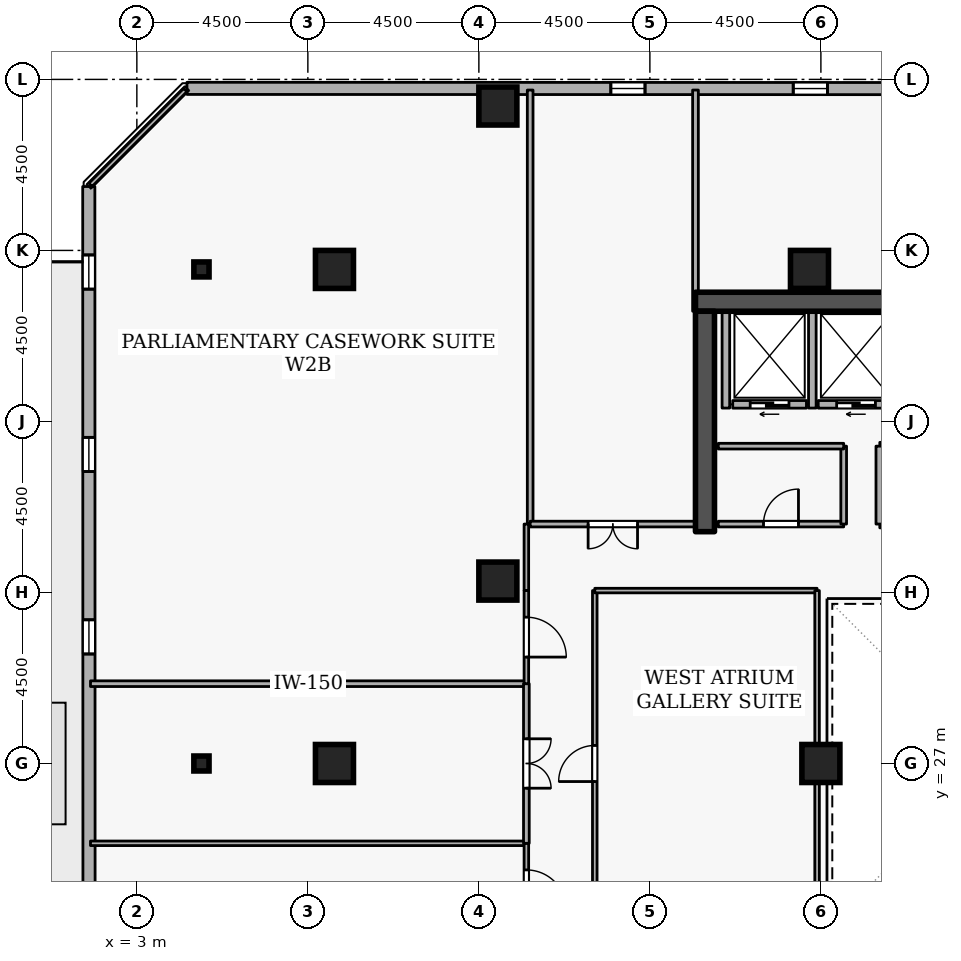
"""IFC4 building model, lengths in metres.
Left out: names, types, materials, properties, quantities, classifications, styles, units other than length and angle.
Written with IfcOpenShell. Run it as: python <this file> out.ifc"""

import sys

from ifc_helpers import new_model, si_unit, direction, frame, frame_2d, origin, origin_2d, place, context, subcontext, project, spatial, rectangle, i_section, extrude, element, fill, save


model = new_model("IFC4")
c1 = context("Model", 3, precision=1e-05, world=origin(), true_north=direction((0.0, 1.0)))
c2 = subcontext(c1, "Body", "Model", "MODEL_VIEW")
j1 = project(units=[si_unit("LENGTHUNIT", "METRE"), si_unit("PLANEANGLEUNIT", "RADIAN")], contexts=[c1])
p1 = place(None, origin())
s1 = spatial("IfcSite", under=j1, at=p1, CompositionType="ELEMENT")
p2 = place(p1, origin())
s2 = spatial("IfcBuilding", under=s1, at=p2, CompositionType="ELEMENT")
p3 = place(p2, frame((0.0, 0.0, 233.1)))
s3 = spatial("IfcBuildingStorey", under=s2, at=p3, CompositionType="ELEMENT", Elevation=233.1)
p4 = place(p3, frame((17.7, 39.15, 0.0), z_axis=(0.0, 0.0, 1.0), x_axis=(1.0, 0.0, 0.0)))
e1 = element("IfcWall", 1, at=p4, inside=s3, PredefinedType="SHEAR", context=c2, shape_type="SweptSolid", body=[
    extrude(rectangle(XDim=15.6, YDim=0.5, at=frame_2d((7.8, 0.0))), origin(), (0.0, 0.0, 1.0), 3.6),
])
p5 = place(p3, frame((17.95, 33.1, 0.0), z_axis=(0.0, 0.0, 1.0), x_axis=(0.0, 1.0, 0.0)))
e2 = element("IfcWall", 2, at=p5, inside=s3, PredefinedType="SHEAR", context=c2, shape_type="SweptSolid", body=[
    extrude(rectangle(XDim=5.8, YDim=0.5, at=frame_2d((2.9, 0.0))), origin(), (0.0, 0.0, 1.0), 3.6),
])
for number, where, z_axis, x_axis in (
    (3, (12.5, 44.3, 0.0), (0.0, 0.0, 1.0), (1.0, 0.0, 0.0)),
    (4, (8.2, 27.0, 0.0), (0.0, 0.0, 1.0), (1.0, 0.0, 0.0)),
    (5, (8.2, 40.0, 0.0), (0.0, 0.0, 1.0), (1.0, 0.0, 0.0)),
    (6, (12.5, 31.8, 0.0), (0.0, 0.0, 1.0), (1.0, 0.0, 0.0)),
    (7, (20.7, 40.0, 0.0), (0.0, 0.0, 1.0), (1.0, 0.0, 0.0)),
    (8, (21.0, 27.0, 0.0), (0.0, 0.0, 1.0), (1.0, 0.0, 0.0)),
):
    element("IfcColumn", number, at=place(p3, frame(where, z_axis=z_axis, x_axis=x_axis)), inside=s3, PredefinedType="COLUMN", context=c2, shape_type="SweptSolid", body=[
        extrude(rectangle(XDim=1.0, YDim=1.0, at=origin_2d()), origin(), (0.0, 0.0, 1.0), 3.6),
    ])
for number, where, z_axis, x_axis in (
    (9, (4.7, 27.0, 0.0), (0.0, 0.0, 1.0), (1.0, 0.0, 0.0)),
    (10, (4.7, 40.0, 0.0), (0.0, 0.0, 1.0), (1.0, 0.0, 0.0)),
):
    element("IfcColumn", number, at=place(p3, frame(where, z_axis=z_axis, x_axis=x_axis)), inside=s3, PredefinedType="COLUMN", context=c2, shape_type="SweptSolid", body=[
        extrude(i_section(OverallWidth=0.399, OverallDepth=0.394, WebThickness=0.023, FlangeThickness=0.037, FilletRadius=0.015, at=origin_2d()), origin(), (0.0, 0.0, 1.0), 3.6),
    ])
p6 = place(p3, frame((37.372, 44.754, 0.0), z_axis=(0.0, 0.0, 1.0), x_axis=(-0.999999944762, 0.000332378036, 0.0)))
e11 = element("IfcWall", 11, at=p6, inside=s3, PredefinedType="STANDARD", context=c2, shape_type="SweptSolid", body=[
    extrude(rectangle(XDim=33.054, YDim=0.32, at=frame_2d((16.527, 0.0))), origin(), (0.0, 0.0, 1.0), 2.7),
])
p7 = place(p6, frame((1.8, 0.0, 0.72)))
e12 = element("IfcOpeningElement", 12, at=p7, cuts=e11, PredefinedType="OPENING", context=c2, shape_type="SweptSolid", body=[
    extrude(rectangle(XDim=0.9, YDim=1.75, at=frame_2d((0.45, 0.875))), frame((0.0, 0.17, 0.0), z_axis=(0.0, -1.0, 0.0), x_axis=(1.0, 0.0, 0.0)), (0.0, 0.0, 1.0), 0.34),
])
p8 = place(p6, frame((6.6, 0.0, 0.72)))
e13 = element("IfcOpeningElement", 13, at=p8, cuts=e11, PredefinedType="OPENING", context=c2, shape_type="SweptSolid", body=[
    extrude(rectangle(XDim=0.9, YDim=1.75, at=frame_2d((0.45, 0.875))), frame((0.0, 0.17, 0.0), z_axis=(0.0, -1.0, 0.0), x_axis=(1.0, 0.0, 0.0)), (0.0, 0.0, 1.0), 0.34),
])
p9 = place(p6, frame((16.2, 0.0, 0.72)))
e14 = element("IfcOpeningElement", 14, at=p9, cuts=e11, PredefinedType="OPENING", context=c2, shape_type="SweptSolid", body=[
    extrude(rectangle(XDim=0.9, YDim=1.75, at=frame_2d((0.45, 0.875))), frame((0.0, 0.17, 0.0), z_axis=(0.0, -1.0, 0.0), x_axis=(1.0, 0.0, 0.0)), (0.0, 0.0, 1.0), 0.34),
])
p10 = place(p6, frame((21.0, 0.0, 0.72)))
e15 = element("IfcOpeningElement", 15, at=p10, cuts=e11, PredefinedType="OPENING", context=c2, shape_type="SweptSolid", body=[
    extrude(rectangle(XDim=0.9, YDim=1.75, at=frame_2d((0.45, 0.875))), frame((0.0, 0.17, 0.0), z_axis=(0.0, -1.0, 0.0), x_axis=(1.0, 0.0, 0.0)), (0.0, 0.0, 1.0), 0.34),
])
p11 = place(p3, frame((1.735, 42.181, 0.0), z_axis=(0.0, 0.0, 1.0), x_axis=(0.000332378036, -0.999999944762, 0.0)))
e16 = element("IfcWall", 16, at=p11, inside=s3, PredefinedType="STANDARD", context=c2, shape_type="SweptSolid", body=[
    extrude(rectangle(XDim=33.054, YDim=0.32, at=frame_2d((16.527, 0.0))), origin(), (0.0, 0.0, 1.0), 2.7),
])
p12 = place(p11, frame((18.327, 0.0, 0.0)))
e17 = element("IfcOpeningElement", 17, at=p12, cuts=e16, PredefinedType="OPENING", context=c2, shape_type="SweptSolid", body=[
    extrude(rectangle(XDim=1.0, YDim=2.08, at=frame_2d((0.5, 1.04))), frame((0.0, 0.17, 0.0), z_axis=(0.0, -1.0, 0.0), x_axis=(1.0, 0.0, 0.0)), (0.0, 0.0, 1.0), 0.34),
])
p13 = place(p11, frame((1.8, 0.0, 0.72)))
e18 = element("IfcOpeningElement", 18, at=p13, cuts=e16, PredefinedType="OPENING", context=c2, shape_type="SweptSolid", body=[
    extrude(rectangle(XDim=0.9, YDim=1.75, at=frame_2d((0.45, 0.875))), frame((0.0, 0.17, 0.0), z_axis=(0.0, -1.0, 0.0), x_axis=(1.0, 0.0, 0.0)), (0.0, 0.0, 1.0), 0.34),
])
p14 = place(p11, frame((6.6, 0.0, 0.72)))
e19 = element("IfcOpeningElement", 19, at=p14, cuts=e16, PredefinedType="OPENING", context=c2, shape_type="SweptSolid", body=[
    extrude(rectangle(XDim=0.9, YDim=1.75, at=frame_2d((0.45, 0.875))), frame((0.0, 0.17, 0.0), z_axis=(0.0, -1.0, 0.0), x_axis=(1.0, 0.0, 0.0)), (0.0, 0.0, 1.0), 0.34),
])
p15 = place(p11, frame((11.4, 0.0, 0.72)))
e20 = element("IfcOpeningElement", 20, at=p15, cuts=e16, PredefinedType="OPENING", context=c2, shape_type="SweptSolid", body=[
    extrude(rectangle(XDim=0.9, YDim=1.75, at=frame_2d((0.45, 0.875))), frame((0.0, 0.17, 0.0), z_axis=(0.0, -1.0, 0.0), x_axis=(1.0, 0.0, 0.0)), (0.0, 0.0, 1.0), 0.34),
])
p16 = place(p11, frame((21.0, 0.0, 0.72)))
e21 = element("IfcOpeningElement", 21, at=p16, cuts=e16, PredefinedType="OPENING", context=c2, shape_type="SweptSolid", body=[
    extrude(rectangle(XDim=0.9, YDim=1.75, at=frame_2d((0.45, 0.875))), frame((0.0, 0.17, 0.0), z_axis=(0.0, -1.0, 0.0), x_axis=(1.0, 0.0, 0.0)), (0.0, 0.0, 1.0), 0.34),
])
p17 = place(p11, frame((25.8, 0.0, 0.72)))
e22 = element("IfcOpeningElement", 22, at=p17, cuts=e16, PredefinedType="OPENING", context=c2, shape_type="SweptSolid", body=[
    extrude(rectangle(XDim=0.9, YDim=1.75, at=frame_2d((0.45, 0.875))), frame((0.0, 0.17, 0.0), z_axis=(0.0, -1.0, 0.0), x_axis=(1.0, 0.0, 0.0)), (0.0, 0.0, 1.0), 0.34),
])
p18 = place(p3, frame((22.92, 36.45, 0.0), z_axis=(0.0, 0.0, 1.0), x_axis=(-1.0, 0.0, 0.0)))
e23 = element("IfcWall", 23, at=p18, inside=s3, PredefinedType="STANDARD", context=c2, shape_type="SweptSolid", body=[
    extrude(rectangle(XDim=1.99, YDim=0.2, at=frame_2d((0.995, 0.0))), origin(), (0.0, 0.0, 1.0), 3.34),
])
p19 = place(p18, frame((0.485, 0.0, 0.0)))
e24 = element("IfcOpeningElement", 24, at=p19, cuts=e23, PredefinedType="OPENING", context=c2, shape_type="SweptSolid", body=[
    extrude(rectangle(XDim=1.02, YDim=2.06, at=frame_2d((0.51, 1.03))), frame((0.0, 0.11, 0.0), z_axis=(0.0, -1.0, 0.0), x_axis=(1.0, 0.0, 0.0)), (0.0, 0.0, 1.0), 0.22),
])
p20 = place(p3, frame((20.62, 36.45, 0.0), z_axis=(0.0, 0.0, 1.0), x_axis=(-1.0, 0.0, 0.0)))
e25 = element("IfcWall", 25, at=p20, inside=s3, PredefinedType="STANDARD", context=c2, shape_type="SweptSolid", body=[
    extrude(rectangle(XDim=1.94, YDim=0.2, at=frame_2d((0.97, 0.0))), origin(), (0.0, 0.0, 1.0), 3.34),
])
p21 = place(p20, frame((0.46, 0.0, 0.0)))
e26 = element("IfcOpeningElement", 26, at=p21, cuts=e25, PredefinedType="OPENING", context=c2, shape_type="SweptSolid", body=[
    extrude(rectangle(XDim=1.02, YDim=2.06, at=frame_2d((0.51, 1.03))), frame((0.0, 0.11, 0.0), z_axis=(0.0, -1.0, 0.0), x_axis=(1.0, 0.0, 0.0)), (0.0, 0.0, 1.0), 0.22),
])
for number, where, z_axis, x_axis in (
    (27, (20.775, 36.352, 0.0), (0.0, 0.0, 1.0), (0.0, 1.0, 0.0)),
    (28, (18.5, 36.352, 0.0), (0.0, 0.0, 1.0), (0.0, 1.0, 0.0)),
):
    element("IfcWall", number, at=place(p3, frame(where, z_axis=z_axis, x_axis=x_axis)), inside=s3, PredefinedType="STANDARD", context=c2, shape_type="SweptSolid", body=[
        extrude(rectangle(XDim=2.536, YDim=0.2, at=frame_2d((1.268, 0.0))), origin(), (0.0, 0.0, 1.0), 3.34),
    ])
p22 = place(p3, frame((22.55, 33.3, 0.0), z_axis=(0.0, 0.0, 1.0), x_axis=(1.0, 0.0, 0.0)))
e29 = element("IfcWall", 29, at=p22, inside=s3, PredefinedType="STANDARD", context=c2, shape_type="SweptSolid", body=[
    extrude(rectangle(XDim=1.8, YDim=0.2, at=frame_2d((0.9, 0.0))), origin(), (0.0, 0.0, 1.0), 3.34),
])
p23 = place(p22, frame((0.46, 0.0, 0.0)))
e30 = element("IfcOpeningElement", 30, at=p23, cuts=e29, PredefinedType="OPENING", context=c2, shape_type="SweptSolid", body=[
    extrude(rectangle(XDim=0.88, YDim=2.04, at=frame_2d((0.44, 1.02))), frame((0.0, 0.11, 0.0), z_axis=(0.0, -1.0, 0.0), x_axis=(1.0, 0.0, 0.0)), (0.0, 0.0, 1.0), 0.22),
])
p24 = place(p3, frame((24.35, 35.35, 0.0), z_axis=(0.0, 0.0, 1.0), x_axis=(-1.0, 0.0, 0.0)))
e31 = element("IfcWall", 31, at=p24, inside=s3, PredefinedType="STANDARD", context=c2, shape_type="SweptSolid", body=[
    extrude(rectangle(XDim=1.8, YDim=0.2, at=frame_2d((0.9, 0.0))), origin(), (0.0, 0.0, 1.0), 3.34),
])
p25 = place(p3, frame((22.55, 35.35, 0.0), z_axis=(0.0, 0.0, 1.0), x_axis=(0.0, -1.0, 0.0)))
e32 = element("IfcWall", 32, at=p25, inside=s3, PredefinedType="STANDARD", context=c2, shape_type="SweptSolid", body=[
    extrude(rectangle(XDim=2.05, YDim=0.2, at=frame_2d((1.025, 0.0))), origin(), (0.0, 0.0, 1.0), 3.34),
])
p26 = place(p3, frame((18.3, 33.3, 0.0), z_axis=(0.0, 0.0, 1.0), x_axis=(1.0, 0.0, 0.0)))
e33 = element("IfcWall", 33, at=p26, inside=s3, PredefinedType="PARTITIONING", context=c2, shape_type="SweptSolid", body=[
    extrude(rectangle(XDim=3.3, YDim=0.15, at=frame_2d((1.65, 0.0))), origin(), (0.0, 0.0, 1.0), 3.34),
])
p27 = place(p26, frame((1.19, 0.0, 0.0)))
e34 = element("IfcOpeningElement", 34, at=p27, cuts=e33, PredefinedType="OPENING", context=c2, shape_type="SweptSolid", body=[
    extrude(rectangle(XDim=0.92, YDim=2.08, at=frame_2d((0.46, 1.04))), frame((0.0, 0.085, 0.0), z_axis=(0.0, -1.0, 0.0), x_axis=(1.0, 0.0, 0.0)), (0.0, 0.0, 1.0), 0.17),
])
p28 = place(p3, frame((21.6, 33.3, 0.0), z_axis=(0.0, 0.0, 1.0), x_axis=(0.0, 1.0, 0.0)))
e35 = element("IfcWall", 35, at=p28, inside=s3, PredefinedType="PARTITIONING", context=c2, shape_type="SweptSolid", body=[
    extrude(rectangle(XDim=2.05, YDim=0.15, at=frame_2d((1.025, 0.0))), origin(), (0.0, 0.0, 1.0), 3.34),
])
p29 = place(p3, frame((21.6, 35.35, 0.0), z_axis=(0.0, 0.0, 1.0), x_axis=(-1.0, 0.0, 0.0)))
e36 = element("IfcWall", 36, at=p29, inside=s3, PredefinedType="PARTITIONING", context=c2, shape_type="SweptSolid", body=[
    extrude(rectangle(XDim=3.3, YDim=0.15, at=frame_2d((1.65, 0.0))), origin(), (0.0, 0.0, 1.0), 3.34),
])
p30 = place(p3, frame((13.35, 33.3, 0.0), z_axis=(0.0, 0.0, 1.0), x_axis=(0.0, 1.0, 0.0)))
e37 = element("IfcWall", 37, at=p30, inside=s3, PredefinedType="PARTITIONING", context=c2, shape_type="SweptSolid", body=[
    extrude(rectangle(XDim=11.42, YDim=0.15, at=frame_2d((5.71, 0.0))), origin(), (0.0, 0.0, 1.0), 3.34),
])
p31 = place(p3, frame((17.7, 44.72, 0.0), z_axis=(0.0, 0.0, 1.0), x_axis=(0.0, -1.0, 0.0)))
e38 = element("IfcWall", 38, at=p31, inside=s3, PredefinedType="PARTITIONING", context=c2, shape_type="SweptSolid", body=[
    extrude(rectangle(XDim=5.82, YDim=0.15, at=frame_2d((2.91, 0.0))), origin(), (0.0, 0.0, 1.0), 2.545),
])
p32 = place(p3, frame((17.7, 33.3, 0.0), z_axis=(0.0, 0.0, 1.0), x_axis=(-1.0, 0.0, 0.0)))
e39 = element("IfcWall", 39, at=p32, inside=s3, PredefinedType="PARTITIONING", context=c2, shape_type="SweptSolid", body=[
    extrude(rectangle(XDim=4.35, YDim=0.15, at=frame_2d((2.175, 0.0))), origin(), (0.0, 0.0, 1.0), 3.34),
])
p33 = place(p32, frame((1.525, 0.0, 0.0)))
e40 = element("IfcOpeningElement", 40, at=p33, cuts=e39, PredefinedType="OPENING", context=c2, shape_type="SweptSolid", body=[
    extrude(rectangle(XDim=1.3, YDim=2.12, at=frame_2d((0.65, 1.06))), frame((0.0, 0.085, 0.0), z_axis=(0.0, -1.0, 0.0), x_axis=(1.0, 0.0, 0.0)), (0.0, 0.0, 1.0), 0.17),
])
p34 = place(p3, frame((1.78, 24.9, 0.0), z_axis=(0.0, 0.0, 1.0), x_axis=(1.0, 0.0, 0.0)))
e41 = element("IfcWall", 41, at=p34, inside=s3, PredefinedType="PARTITIONING", context=c2, shape_type="SweptSolid", body=[
    extrude(rectangle(XDim=11.47, YDim=0.12, at=frame_2d((5.735, 0.0))), origin(), (0.0, 0.0, 1.0), 3.34),
])
p35 = place(p3, frame((13.25, 24.9, 0.0), z_axis=(0.0, 0.0, 1.0), x_axis=(0.0, -1.0, 0.0)))
e42 = element("IfcWall", 42, at=p35, inside=s3, PredefinedType="PARTITIONING", context=c2, shape_type="SweptSolid", body=[
    extrude(rectangle(XDim=2.45, YDim=0.12, at=frame_2d((1.225, 0.0))), origin(), (0.0, 0.0, 1.0), 3.34),
])
p36 = place(p35, frame((0.7, 0.0, 0.0)))
e43 = element("IfcOpeningElement", 43, at=p36, cuts=e42, PredefinedType="OPENING", context=c2, shape_type="SweptSolid", body=[
    extrude(rectangle(XDim=1.05, YDim=2.1, at=frame_2d((0.525, 1.05))), frame((0.0, 0.07, 0.0), z_axis=(0.0, -1.0, 0.0), x_axis=(1.0, 0.0, 0.0)), (0.0, 0.0, 1.0), 0.14),
])
p37 = place(p3, frame((1.78, 29.1, 0.0), z_axis=(0.0, 0.0, 1.0), x_axis=(1.0, 0.0, 0.0)))
e44 = element("IfcWall", 44, at=p37, inside=s3, PredefinedType="PARTITIONING", context=c2, shape_type="SweptSolid", body=[
    extrude(rectangle(XDim=11.47, YDim=0.15, at=frame_2d((5.735, 0.0))), origin(), (0.0, 0.0, 1.0), 3.34),
])
p38 = place(p3, frame((13.25, 29.1, 0.0), z_axis=(0.0, 0.0, 1.0), x_axis=(0.0, -1.0, 0.0)))
e45 = element("IfcWall", 45, at=p38, inside=s3, PredefinedType="PARTITIONING", context=c2, shape_type="SweptSolid", body=[
    extrude(rectangle(XDim=4.2, YDim=0.15, at=frame_2d((2.1, 0.0))), origin(), (0.0, 0.0, 1.0), 3.34),
])
p39 = place(p38, frame((1.45, 0.0, 0.0)))
e46 = element("IfcOpeningElement", 46, at=p39, cuts=e45, PredefinedType="OPENING", context=c2, shape_type="SweptSolid", body=[
    extrude(rectangle(XDim=1.3, YDim=2.12, at=frame_2d((0.65, 1.06))), frame((0.0, 0.085, 0.0), z_axis=(0.0, -1.0, 0.0), x_axis=(1.0, 0.0, 0.0)), (0.0, 0.0, 1.0), 0.17),
])
p40 = place(p3, frame((1.78, 42.225, 0.0), z_axis=(0.0, 0.0, 1.0), x_axis=(0.707106781187, 0.707106781187, 0.0)))
e47 = element("IfcWall", 47, at=p40, inside=s3, PredefinedType="PARTITIONING", context=c2, shape_type="SweptSolid", body=[
    extrude(rectangle(XDim=3.528, YDim=0.12, at=frame_2d((1.764, 0.0))), origin(), (0.0, 0.0, 1.0), 3.34),
])
p41 = place(p3, frame((13.25, 33.3, 0.0), z_axis=(0.0, 0.0, 1.0), x_axis=(0.0, -1.0, 0.0)))
e48 = element("IfcWall", 48, at=p41, inside=s3, PredefinedType="PARTITIONING", context=c2, shape_type="SweptSolid", body=[
    extrude(rectangle(XDim=1.75, YDim=0.12, at=frame_2d((0.875, 0.0))), origin(), (0.0, 0.0, 1.0), 3.34),
])
p42 = place(p3, frame((13.25, 31.55, 0.0), z_axis=(0.0, 0.0, 1.0), x_axis=(0.0, -1.0, 0.0)))
e49 = element("IfcWall", 49, at=p42, inside=s3, PredefinedType="PARTITIONING", context=c2, shape_type="SweptSolid", body=[
    extrude(rectangle(XDim=2.45, YDim=0.12, at=frame_2d((1.225, 0.0))), origin(), (0.0, 0.0, 1.0), 3.34),
])
p43 = place(p42, frame((0.7, 0.0, 0.0)))
e50 = element("IfcOpeningElement", 50, at=p43, cuts=e49, PredefinedType="OPENING", context=c2, shape_type="SweptSolid", body=[
    extrude(rectangle(XDim=1.05, YDim=2.1, at=frame_2d((0.525, 1.05))), frame((0.0, 0.07, 0.0), z_axis=(0.0, -1.0, 0.0), x_axis=(1.0, 0.0, 0.0)), (0.0, 0.0, 1.0), 0.14),
])
p44 = place(p3, frame((15.05, 22.45, 0.0), z_axis=(0.0, 0.0, 1.0), x_axis=(0.0, 1.0, 0.0)))
e51 = element("IfcWall", 51, at=p44, inside=s3, PredefinedType="PARTITIONING", context=c2, shape_type="SweptSolid", body=[
    extrude(rectangle(XDim=9.1, YDim=0.12, at=frame_2d((4.55, 0.0))), origin(), (0.0, 0.0, 1.0), 3.34),
])
p45 = place(p44, frame((4.075, 0.0, 0.0)))
e52 = element("IfcOpeningElement", 52, at=p45, cuts=e51, PredefinedType="OPENING", context=c2, shape_type="SweptSolid", body=[
    extrude(rectangle(XDim=0.95, YDim=2.1, at=frame_2d((0.475, 1.05))), frame((0.0, 0.07, 0.0), z_axis=(0.0, -1.0, 0.0), x_axis=(1.0, 0.0, 0.0)), (0.0, 0.0, 1.0), 0.14),
])
p46 = place(p3, frame((15.05, 31.55, 0.0), z_axis=(0.0, 0.0, 1.0), x_axis=(1.0, 0.0, 0.0)))
e53 = element("IfcWall", 53, at=p46, inside=s3, PredefinedType="PARTITIONING", context=c2, shape_type="SweptSolid", body=[
    extrude(rectangle(XDim=5.85, YDim=0.12, at=frame_2d((2.925, 0.0))), origin(), (0.0, 0.0, 1.0), 3.34),
])
p47 = place(p3, frame((20.9, 31.55, 0.0), z_axis=(0.0, 0.0, 1.0), x_axis=(0.0, -1.0, 0.0)))
e54 = element("IfcWall", 54, at=p47, inside=s3, PredefinedType="PARTITIONING", context=c2, shape_type="SweptSolid", body=[
    extrude(rectangle(XDim=9.1, YDim=0.12, at=frame_2d((4.55, 0.0))), origin(), (0.0, 0.0, 1.0), 3.34),
])
p48 = place(p9, origin())
e55 = element("IfcWindow", 55, at=p48, inside=s3, PartitioningType="SINGLE_PANEL", PredefinedType="WINDOW", context=c2, shape_type="SweptSolid", body=[
    extrude(rectangle(XDim=0.9, YDim=1.75, at=frame_2d((0.45, 0.875))), frame((0.0, 0.03, 0.0), z_axis=(0.0, -1.0, 0.0), x_axis=(1.0, 0.0, 0.0)), (0.0, 0.0, 1.0), 0.06),
])
fill(e14, e55)
p49 = place(p10, origin())
e56 = element("IfcWindow", 56, at=p49, inside=s3, PartitioningType="SINGLE_PANEL", PredefinedType="WINDOW", context=c2, shape_type="SweptSolid", body=[
    extrude(rectangle(XDim=0.9, YDim=1.75, at=frame_2d((0.45, 0.875))), frame((0.0, 0.03, 0.0), z_axis=(0.0, -1.0, 0.0), x_axis=(1.0, 0.0, 0.0)), (0.0, 0.0, 1.0), 0.06),
])
fill(e15, e56)
p50 = place(p13, origin())
e57 = element("IfcWindow", 57, at=p50, inside=s3, PartitioningType="SINGLE_PANEL", PredefinedType="WINDOW", context=c2, shape_type="SweptSolid", body=[
    extrude(rectangle(XDim=0.9, YDim=1.75, at=frame_2d((0.45, 0.875))), frame((0.0, 0.03, 0.0), z_axis=(0.0, -1.0, 0.0), x_axis=(1.0, 0.0, 0.0)), (0.0, 0.0, 1.0), 0.06),
])
fill(e18, e57)
p51 = place(p14, origin())
e58 = element("IfcWindow", 58, at=p51, inside=s3, PartitioningType="SINGLE_PANEL", PredefinedType="WINDOW", context=c2, shape_type="SweptSolid", body=[
    extrude(rectangle(XDim=0.9, YDim=1.75, at=frame_2d((0.45, 0.875))), frame((0.0, 0.03, 0.0), z_axis=(0.0, -1.0, 0.0), x_axis=(1.0, 0.0, 0.0)), (0.0, 0.0, 1.0), 0.06),
])
fill(e19, e58)
p52 = place(p15, origin())
e59 = element("IfcWindow", 59, at=p52, inside=s3, PartitioningType="SINGLE_PANEL", PredefinedType="WINDOW", context=c2, shape_type="SweptSolid", body=[
    extrude(rectangle(XDim=0.9, YDim=1.75, at=frame_2d((0.45, 0.875))), frame((0.0, 0.03, 0.0), z_axis=(0.0, -1.0, 0.0), x_axis=(1.0, 0.0, 0.0)), (0.0, 0.0, 1.0), 0.06),
])
fill(e20, e59)
p53 = place(p19, origin())
e60 = element("IfcDoor", 60, at=p53, inside=s3, OperationType="SLIDING_TO_LEFT", PredefinedType="DOOR", context=c2, shape_type="SweptSolid", body=[
    extrude(rectangle(XDim=1.02, YDim=2.06, at=frame_2d((0.51, 1.03))), frame((0.0, 0.025, 0.0), z_axis=(0.0, -1.0, 0.0), x_axis=(1.0, 0.0, 0.0)), (0.0, 0.0, 1.0), 0.05),
])
fill(e24, e60)
p54 = place(p21, origin())
e61 = element("IfcDoor", 61, at=p54, inside=s3, OperationType="SLIDING_TO_LEFT", PredefinedType="DOOR", context=c2, shape_type="SweptSolid", body=[
    extrude(rectangle(XDim=1.02, YDim=2.06, at=frame_2d((0.51, 1.03))), frame((0.0, 0.025, 0.0), z_axis=(0.0, -1.0, 0.0), x_axis=(1.0, 0.0, 0.0)), (0.0, 0.0, 1.0), 0.05),
])
fill(e26, e61)
p55 = place(p27, origin())
e62 = element("IfcDoor", 62, at=p55, inside=s3, OperationType="SINGLE_SWING_RIGHT", PredefinedType="DOOR", context=c2, shape_type="SweptSolid", body=[
    extrude(rectangle(XDim=0.92, YDim=2.08, at=frame_2d((0.46, 1.04))), frame((0.0, 0.025, 0.0), z_axis=(0.0, -1.0, 0.0), x_axis=(1.0, 0.0, 0.0)), (0.0, 0.0, 1.0), 0.05),
])
fill(e34, e62)
p56 = place(p33, origin())
e63 = element("IfcDoor", 63, at=p56, inside=s3, OperationType="DOUBLE_DOOR_SINGLE_SWING", PredefinedType="DOOR", context=c2, shape_type="SweptSolid", body=[
    extrude(rectangle(XDim=1.3, YDim=2.12, at=frame_2d((0.65, 1.06))), frame((0.0, 0.025, 0.0), z_axis=(0.0, -1.0, 0.0), x_axis=(1.0, 0.0, 0.0)), (0.0, 0.0, 1.0), 0.05),
])
fill(e40, e63)
p57 = place(p36, origin())
e64 = element("IfcDoor", 64, at=p57, inside=s3, OperationType="SINGLE_SWING_RIGHT", PredefinedType="DOOR", context=c2, shape_type="SweptSolid", body=[
    extrude(rectangle(XDim=1.05, YDim=2.1, at=frame_2d((0.525, 1.05))), frame((0.0, 0.025, 0.0), z_axis=(0.0, -1.0, 0.0), x_axis=(1.0, 0.0, 0.0)), (0.0, 0.0, 1.0), 0.05),
])
fill(e43, e64)
p58 = place(p39, origin())
e65 = element("IfcDoor", 65, at=p58, inside=s3, OperationType="DOUBLE_DOOR_SINGLE_SWING", PredefinedType="DOOR", context=c2, shape_type="SweptSolid", body=[
    extrude(rectangle(XDim=1.3, YDim=2.12, at=frame_2d((0.65, 1.06))), frame((0.0, 0.025, 0.0), z_axis=(0.0, -1.0, 0.0), x_axis=(1.0, 0.0, 0.0)), (0.0, 0.0, 1.0), 0.05),
])
fill(e46, e65)
p59 = place(p43, origin())
e66 = element("IfcDoor", 66, at=p59, inside=s3, OperationType="SINGLE_SWING_RIGHT", PredefinedType="DOOR", context=c2, shape_type="SweptSolid", body=[
    extrude(rectangle(XDim=1.05, YDim=2.1, at=frame_2d((0.525, 1.05))), frame((0.0, 0.025, 0.0), z_axis=(0.0, -1.0, 0.0), x_axis=(1.0, 0.0, 0.0)), (0.0, 0.0, 1.0), 0.05),
])
fill(e50, e66)
p60 = place(p45, origin())
e67 = element("IfcDoor", 67, at=p60, inside=s3, OperationType="SINGLE_SWING_LEFT", PredefinedType="DOOR", context=c2, shape_type="SweptSolid", body=[
    extrude(rectangle(XDim=0.95, YDim=2.1, at=frame_2d((0.475, 1.05))), frame((0.0, 0.025, 0.0), z_axis=(0.0, -1.0, 0.0), x_axis=(1.0, 0.0, 0.0)), (0.0, 0.0, 1.0), 0.05),
])
fill(e52, e67)
save(model, sys.argv[1])
